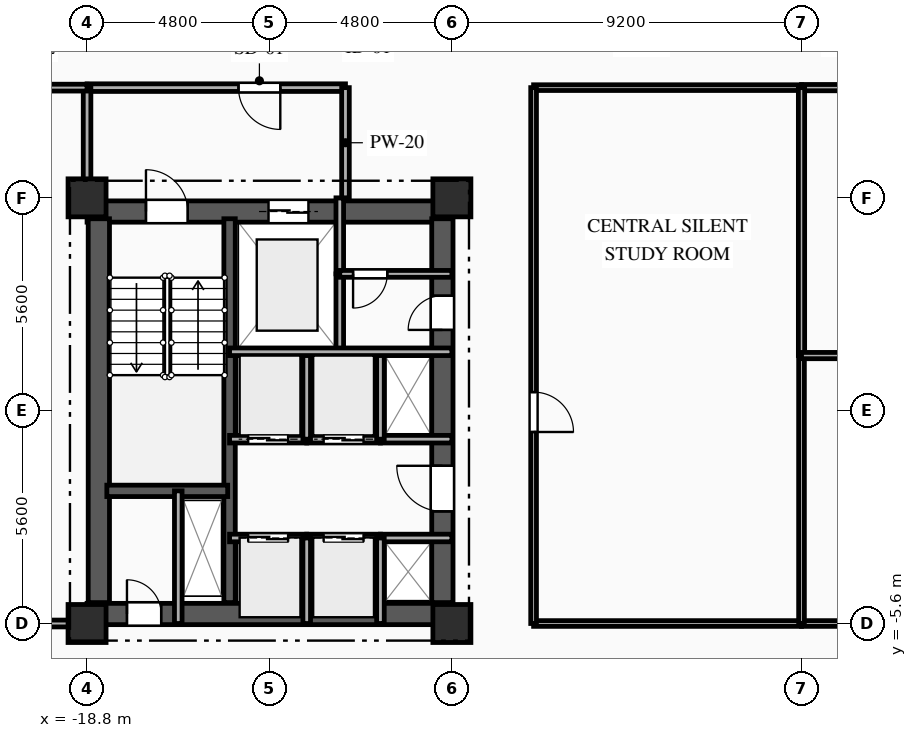
"""IFC4 building model, lengths in metres.
Left out: names, types, materials, properties, quantities, classifications, styles, units other than length and angle.
Written with IfcOpenShell. Run it as: python <this file> out.ifc"""

import sys

from ifc_helpers import new_model, si_unit, direction, frame, frame_2d, origin, origin_2d, place, context, subcontext, project, spatial, rectangle, extrude, element, fill, save


model = new_model("IFC4")
c1 = context("Model", 3, precision=1e-05, world=origin(), true_north=direction((0.0, 1.0)))
c2 = subcontext(c1, "Body", "Model", "MODEL_VIEW")
j1 = project(units=[si_unit("LENGTHUNIT", "METRE"), si_unit("PLANEANGLEUNIT", "RADIAN")], contexts=[c1])
p1 = place(None, origin())
s1 = spatial("IfcSite", under=j1, at=p1, CompositionType="ELEMENT")
p2 = place(p1, origin())
s2 = spatial("IfcBuilding", under=s1, at=p2, CompositionType="ELEMENT")
p3 = place(p2, frame((0.0, 0.0, 82.35)))
s3 = spatial("IfcBuildingStorey", under=s2, at=p3, CompositionType="ELEMENT", Elevation=82.35)
for number, where, z_axis, x_axis in (
    (1, (-18.8, -5.6, 0.0), (0.0, 0.0, 1.0), (1.0, 0.0, 0.0)),
    (2, (-18.8, 5.6, 0.0), (0.0, 0.0, 1.0), (1.0, 0.0, 0.0)),
    (3, (-9.2, -5.6, 0.0), (0.0, 0.0, 1.0), (1.0, 0.0, 0.0)),
    (4, (-9.2, 5.6, 0.0), (0.0, 0.0, 1.0), (1.0, 0.0, 0.0)),
):
    element("IfcColumn", number, at=place(p3, frame(where, z_axis=z_axis, x_axis=x_axis)), inside=s3, PredefinedType="COLUMN", context=c2, shape_type="SweptSolid", body=[
        extrude(rectangle(XDim=1.0, YDim=1.0, at=origin_2d()), origin(), (0.0, 0.0, 1.0), 3.35),
    ])
p4 = place(p3, frame((-18.8, 5.24, 0.0), z_axis=(0.0, 0.0, 1.0), x_axis=(1.0, 0.0, 0.0)))
e5 = element("IfcWall", 5, at=p4, inside=s3, PredefinedType="SHEAR", context=c2, shape_type="SweptSolid", body=[
    extrude(rectangle(XDim=9.6, YDim=0.56, at=frame_2d((4.8, 0.0))), origin(), (0.0, 0.0, 1.0), 3.045),
])
p5 = place(p4, frame((1.55, 0.0, 0.0)))
e6 = element("IfcOpeningElement", 6, at=p5, cuts=e5, PredefinedType="OPENING", context=c2, shape_type="SweptSolid", body=[
    extrude(rectangle(XDim=1.1, YDim=2.15, at=frame_2d((0.55, 1.075))), frame((0.0, 0.29, 0.0), z_axis=(0.0, -1.0, 0.0), x_axis=(1.0, 0.0, 0.0)), (0.0, 0.0, 1.0), 0.58),
])
p6 = place(p4, frame((4.775, 0.0, 0.0)))
e7 = element("IfcOpeningElement", 7, at=p6, cuts=e5, PredefinedType="OPENING", context=c2, shape_type="SweptSolid", body=[
    extrude(rectangle(XDim=1.05, YDim=2.1, at=frame_2d((0.525, 1.05))), frame((0.0, 0.29, 0.0), z_axis=(0.0, -1.0, 0.0), x_axis=(1.0, 0.0, 0.0)), (0.0, 0.0, 1.0), 0.58),
])
p7 = place(p3, frame((-18.8, -5.35, 0.0), z_axis=(0.0, 0.0, 1.0), x_axis=(1.0, 0.0, 0.0)))
e8 = element("IfcWall", 8, at=p7, inside=s3, PredefinedType="SHEAR", context=c2, shape_type="SweptSolid", body=[
    extrude(rectangle(XDim=9.6, YDim=0.56, at=frame_2d((4.8, 0.0))), origin(), (0.0, 0.0, 1.0), 3.045),
])
p8 = place(p7, frame((1.05, 0.0, 0.0)))
e9 = element("IfcOpeningElement", 9, at=p8, cuts=e8, PredefinedType="OPENING", context=c2, shape_type="SweptSolid", body=[
    extrude(rectangle(XDim=0.9, YDim=2.1, at=frame_2d((0.45, 1.05))), frame((0.0, 0.29, 0.0), z_axis=(0.0, -1.0, 0.0), x_axis=(1.0, 0.0, 0.0)), (0.0, 0.0, 1.0), 0.58),
])
p9 = place(p3, frame((-18.49, -5.05, 0.0), z_axis=(0.0, 0.0, 1.0), x_axis=(0.0, 1.0, 0.0)))
e10 = element("IfcWall", 10, at=p9, inside=s3, PredefinedType="SHEAR", context=c2, shape_type="SweptSolid", body=[
    extrude(rectangle(XDim=10.1, YDim=0.56, at=frame_2d((5.05, 0.0))), origin(), (0.0, 0.0, 1.0), 3.045),
])
p10 = place(p3, frame((-9.45, -5.05, 0.0), z_axis=(0.0, 0.0, 1.0), x_axis=(0.0, 1.0, 0.0)))
e11 = element("IfcWall", 11, at=p10, inside=s3, PredefinedType="SHEAR", context=c2, shape_type="SweptSolid", body=[
    extrude(rectangle(XDim=10.1, YDim=0.56, at=frame_2d((5.05, 0.0))), origin(), (0.0, 0.0, 1.0), 3.045),
])
p11 = place(p10, frame((7.175, 0.0, 0.0)))
e12 = element("IfcOpeningElement", 12, at=p11, cuts=e11, PredefinedType="OPENING", context=c2, shape_type="SweptSolid", body=[
    extrude(rectangle(XDim=0.9, YDim=2.1, at=frame_2d((0.45, 1.05))), frame((0.0, 0.29, 0.0), z_axis=(0.0, -1.0, 0.0), x_axis=(1.0, 0.0, 0.0)), (0.0, 0.0, 1.0), 0.58),
])
p12 = place(p10, frame((2.4, 0.0, 0.0)))
e13 = element("IfcOpeningElement", 13, at=p12, cuts=e11, PredefinedType="OPENING", context=c2, shape_type="SweptSolid", body=[
    extrude(rectangle(XDim=1.2, YDim=2.15, at=frame_2d((0.6, 1.075))), frame((0.0, 0.29, 0.0), z_axis=(0.0, -1.0, 0.0), x_axis=(1.0, 0.0, 0.0)), (0.0, 0.0, 1.0), 0.58),
])
p13 = place(p3, frame((-15.05, -5.05, 0.0), z_axis=(0.0, 0.0, 1.0), x_axis=(0.0, 1.0, 0.0)))
e14 = element("IfcWall", 14, at=p13, inside=s3, PredefinedType="SHEAR", context=c2, shape_type="SweptSolid", body=[
    extrude(rectangle(XDim=10.1, YDim=0.3, at=frame_2d((5.05, 0.0))), origin(), (0.0, 0.0, 1.0), 3.045),
])
p14 = place(p3, frame((-18.28, -2.11, 0.0), z_axis=(0.0, 0.0, 1.0), x_axis=(1.0, 0.0, 0.0)))
e15 = element("IfcWall", 15, at=p14, inside=s3, PredefinedType="SHEAR", context=c2, shape_type="SweptSolid", body=[
    extrude(rectangle(XDim=3.18, YDim=0.3, at=frame_2d((1.59, 0.0))), origin(), (0.0, 0.0, 1.0), 3.045),
])
p15 = place(p3, frame((-16.4, -5.6, 0.0), z_axis=(0.0, 0.0, 1.0), x_axis=(0.0, 1.0, 0.0)))
e16 = element("IfcWall", 16, at=p15, inside=s3, PredefinedType="PARTITIONING", context=c2, shape_type="SweptSolid", body=[
    extrude(rectangle(XDim=3.49, YDim=0.2, at=frame_2d((1.745, 0.0))), origin(), (0.0, 0.0, 1.0), 3.045),
])
p16 = place(p3, frame((-12.15, 1.55, 0.0), z_axis=(0.0, 0.0, 1.0), x_axis=(0.0, 1.0, 0.0)))
e17 = element("IfcWall", 17, at=p16, inside=s3, PredefinedType="PARTITIONING", context=c2, shape_type="SweptSolid", body=[
    extrude(rectangle(XDim=2.05, YDim=0.2, at=frame_2d((1.025, 0.0))), origin(), (0.0, 0.0, 1.0), 3.045),
])
p17 = place(p3, frame((-12.15, 3.6, 0.0), z_axis=(0.0, 0.0, 1.0), x_axis=(0.0, 1.0, 0.0)))
e18 = element("IfcWall", 18, at=p17, inside=s3, PredefinedType="PARTITIONING", context=c2, shape_type="SweptSolid", body=[
    extrude(rectangle(XDim=2.0, YDim=0.2, at=frame_2d((1.0, 0.0))), origin(), (0.0, 0.0, 1.0), 3.045),
])
p18 = place(p3, frame((-12.0, 8.5, 0.0), z_axis=(0.0, 0.0, 1.0), x_axis=(-1.0, 0.0, 0.0)))
e19 = element("IfcWall", 19, at=p18, inside=s3, PredefinedType="PARTITIONING", context=c2, shape_type="SweptSolid", body=[
    extrude(rectangle(XDim=6.8, YDim=0.2, at=frame_2d((3.4, 0.0))), origin(), (0.0, 0.0, 1.0), 3.045),
])
p19 = place(p18, frame((1.715, 0.0, 0.0)))
e20 = element("IfcOpeningElement", 20, at=p19, cuts=e19, PredefinedType="OPENING", context=c2, shape_type="SweptSolid", body=[
    extrude(rectangle(XDim=1.1, YDim=2.15, at=frame_2d((0.55, 1.075))), frame((0.0, 0.11, 0.0), z_axis=(0.0, -1.0, 0.0), x_axis=(1.0, 0.0, 0.0)), (0.0, 0.0, 1.0), 0.22),
])
p20 = place(p3, frame((-12.0, 5.6, 0.0), z_axis=(0.0, 0.0, 1.0), x_axis=(0.0, 1.0, 0.0)))
e21 = element("IfcWall", 21, at=p20, inside=s3, PredefinedType="PARTITIONING", context=c2, shape_type="SweptSolid", body=[
    extrude(rectangle(XDim=2.9, YDim=0.2, at=frame_2d((1.45, 0.0))), origin(), (0.0, 0.0, 1.0), 3.045),
])
p21 = place(p3, frame((-18.8, 8.5, 0.0), z_axis=(0.0, 0.0, 1.0), x_axis=(0.0, -1.0, 0.0)))
e22 = element("IfcWall", 22, at=p21, inside=s3, PredefinedType="PARTITIONING", context=c2, shape_type="SweptSolid", body=[
    extrude(rectangle(XDim=2.9, YDim=0.2, at=frame_2d((1.45, 0.0))), origin(), (0.0, 0.0, 1.0), 2.53),
])
p22 = place(p3, frame((-9.2, 3.6, 0.0), z_axis=(0.0, 0.0, 1.0), x_axis=(-1.0, 0.0, 0.0)))
e23 = element("IfcWall", 23, at=p22, inside=s3, PredefinedType="PARTITIONING", context=c2, shape_type="SweptSolid", body=[
    extrude(rectangle(XDim=2.95, YDim=0.18, at=frame_2d((1.475, 0.0))), origin(), (0.0, 0.0, 1.0), 3.045),
])
p23 = place(p22, frame((1.7, 0.0, 0.0)))
e24 = element("IfcOpeningElement", 24, at=p23, cuts=e23, PredefinedType="OPENING", context=c2, shape_type="SweptSolid", body=[
    extrude(rectangle(XDim=0.9, YDim=2.1, at=frame_2d((0.45, 1.05))), frame((0.0, 0.1, 0.0), z_axis=(0.0, -1.0, 0.0), x_axis=(1.0, 0.0, 0.0)), (0.0, 0.0, 1.0), 0.2),
])
p24 = place(p3, frame((-15.05, -3.35, 0.0), z_axis=(0.0, 0.0, 1.0), x_axis=(1.0, 0.0, 0.0)))
e25 = element("IfcWall", 25, at=p24, inside=s3, PredefinedType="PARTITIONING", context=c2, shape_type="SweptSolid", body=[
    extrude(rectangle(XDim=2.03, YDim=0.2, at=frame_2d((1.015, 0.0))), origin(), (0.0, 0.0, 1.0), 3.045),
])
p25 = place(p24, frame((0.49, 0.0, 0.0)))
e26 = element("IfcOpeningElement", 26, at=p25, cuts=e25, PredefinedType="OPENING", context=c2, shape_type="SweptSolid", body=[
    extrude(rectangle(XDim=1.05, YDim=2.1, at=frame_2d((0.525, 1.05))), frame((0.0, 0.11, 0.0), z_axis=(0.0, -1.0, 0.0), x_axis=(1.0, 0.0, 0.0)), (0.0, 0.0, 1.0), 0.22),
])
p26 = place(p3, frame((-13.02, -3.35, 0.0), z_axis=(0.0, 0.0, 1.0), x_axis=(1.0, 0.0, 0.0)))
e27 = element("IfcWall", 27, at=p26, inside=s3, PredefinedType="PARTITIONING", context=c2, shape_type="SweptSolid", body=[
    extrude(rectangle(XDim=1.94, YDim=0.2, at=frame_2d((0.97, 0.0))), origin(), (0.0, 0.0, 1.0), 3.045),
])
p27 = place(p26, frame((0.445, 0.0, 0.0)))
e28 = element("IfcOpeningElement", 28, at=p27, cuts=e27, PredefinedType="OPENING", context=c2, shape_type="SweptSolid", body=[
    extrude(rectangle(XDim=1.05, YDim=2.1, at=frame_2d((0.525, 1.05))), frame((0.0, 0.11, 0.0), z_axis=(0.0, -1.0, 0.0), x_axis=(1.0, 0.0, 0.0)), (0.0, 0.0, 1.0), 0.22),
])
p28 = place(p3, frame((-11.08, -3.35, 0.0), z_axis=(0.0, 0.0, 1.0), x_axis=(1.0, 0.0, 0.0)))
e29 = element("IfcWall", 29, at=p28, inside=s3, PredefinedType="PARTITIONING", context=c2, shape_type="SweptSolid", body=[
    extrude(rectangle(XDim=1.88, YDim=0.2, at=frame_2d((0.94, 0.0))), origin(), (0.0, 0.0, 1.0), 2.76),
])
p29 = place(p3, frame((-13.02, -0.75, 0.0), z_axis=(0.0, 0.0, 1.0), x_axis=(-1.0, 0.0, 0.0)))
e30 = element("IfcWall", 30, at=p29, inside=s3, PredefinedType="PARTITIONING", context=c2, shape_type="SweptSolid", body=[
    extrude(rectangle(XDim=2.03, YDim=0.2, at=frame_2d((1.015, 0.0))), origin(), (0.0, 0.0, 1.0), 3.045),
])
p30 = place(p29, frame((0.49, 0.0, 0.0)))
e31 = element("IfcOpeningElement", 31, at=p30, cuts=e30, PredefinedType="OPENING", context=c2, shape_type="SweptSolid", body=[
    extrude(rectangle(XDim=1.05, YDim=2.1, at=frame_2d((0.525, 1.05))), frame((0.0, 0.11, 0.0), z_axis=(0.0, -1.0, 0.0), x_axis=(1.0, 0.0, 0.0)), (0.0, 0.0, 1.0), 0.22),
])
p31 = place(p3, frame((-11.08, -0.75, 0.0), z_axis=(0.0, 0.0, 1.0), x_axis=(-1.0, 0.0, 0.0)))
e32 = element("IfcWall", 32, at=p31, inside=s3, PredefinedType="PARTITIONING", context=c2, shape_type="SweptSolid", body=[
    extrude(rectangle(XDim=1.94, YDim=0.2, at=frame_2d((0.97, 0.0))), origin(), (0.0, 0.0, 1.0), 3.045),
])
p32 = place(p31, frame((0.445, 0.0, 0.0)))
e33 = element("IfcOpeningElement", 33, at=p32, cuts=e32, PredefinedType="OPENING", context=c2, shape_type="SweptSolid", body=[
    extrude(rectangle(XDim=1.05, YDim=2.1, at=frame_2d((0.525, 1.05))), frame((0.0, 0.11, 0.0), z_axis=(0.0, -1.0, 0.0), x_axis=(1.0, 0.0, 0.0)), (0.0, 0.0, 1.0), 0.22),
])
p33 = place(p3, frame((-9.2, -0.75, 0.0), z_axis=(0.0, 0.0, 1.0), x_axis=(-1.0, 0.0, 0.0)))
e34 = element("IfcWall", 34, at=p33, inside=s3, PredefinedType="PARTITIONING", context=c2, shape_type="SweptSolid", body=[
    extrude(rectangle(XDim=1.88, YDim=0.2, at=frame_2d((0.94, 0.0))), origin(), (0.0, 0.0, 1.0), 3.045),
])
for number, where, z_axis, x_axis in (
    (35, (-13.02, -5.6, 0.0), (0.0, 0.0, 1.0), (0.0, 1.0, 0.0)),
    (36, (-11.08, -5.6, 0.0), (0.0, 0.0, 1.0), (0.0, 1.0, 0.0)),
):
    element("IfcWall", number, at=place(p3, frame(where, z_axis=z_axis, x_axis=x_axis)), inside=s3, PredefinedType="PARTITIONING", context=c2, shape_type="SweptSolid", body=[
        extrude(rectangle(XDim=2.25, YDim=0.2, at=frame_2d((1.125, 0.0))), origin(), (0.0, 0.0, 1.0), 3.045),
    ])
for number, where, z_axis, x_axis in (
    (37, (-13.02, -0.75, 0.0), (0.0, 0.0, 1.0), (0.0, 1.0, 0.0)),
    (38, (-11.08, -0.75, 0.0), (0.0, 0.0, 1.0), (0.0, 1.0, 0.0)),
):
    element("IfcWall", number, at=place(p3, frame(where, z_axis=z_axis, x_axis=x_axis)), inside=s3, PredefinedType="PARTITIONING", context=c2, shape_type="SweptSolid", body=[
        extrude(rectangle(XDim=2.3, YDim=0.2, at=frame_2d((1.15, 0.0))), origin(), (0.0, 0.0, 1.0), 3.045),
    ])
p34 = place(p3, frame((-18.8, 8.5, 0.0), z_axis=(0.0, 0.0, 1.0), x_axis=(-1.0, 0.0, 0.0)))
e39 = element("IfcWall", 39, at=p34, inside=s3, PredefinedType="PARTITIONING", context=c2, shape_type="SweptSolid", body=[
    extrude(rectangle(XDim=2.65, YDim=0.18, at=frame_2d((1.325, 0.0))), origin(), (0.0, 0.0, 1.0), 3.045),
])
p35 = place(p34, frame((1.009, 0.0, 0.0)))
e40 = element("IfcOpeningElement", 40, at=p35, cuts=e39, PredefinedType="OPENING", context=c2, shape_type="SweptSolid", body=[
    extrude(rectangle(XDim=1.0, YDim=2.15, at=frame_2d((0.5, 1.075))), frame((0.0, 0.1, 0.0), z_axis=(0.0, -1.0, 0.0), x_axis=(1.0, 0.0, 0.0)), (0.0, 0.0, 1.0), 0.2),
])
p36 = place(p3, frame((0.0, 8.5, 0.0), z_axis=(0.0, 0.0, 1.0), x_axis=(-1.0, 0.0, 0.0)))
e41 = element("IfcWall", 41, at=p36, inside=s3, PredefinedType="PARTITIONING", context=c2, shape_type="SweptSolid", body=[
    extrude(rectangle(XDim=7.05, YDim=0.15, at=frame_2d((3.525, 0.0))), origin(), (0.0, 0.0, 1.0), 3.045),
])
p37 = place(p3, frame((7.05, 8.5, 0.0), z_axis=(0.0, 0.0, 1.0), x_axis=(-1.0, 0.0, 0.0)))
e42 = element("IfcWall", 42, at=p37, inside=s3, PredefinedType="PARTITIONING", context=c2, shape_type="SweptSolid", body=[
    extrude(rectangle(XDim=7.05, YDim=0.165, at=frame_2d((3.525, 0.0))), origin(), (0.0, 0.0, 1.0), 3.045),
])
p38 = place(p37, frame((4.728, 0.0, 0.0)))
e43 = element("IfcOpeningElement", 43, at=p38, cuts=e42, PredefinedType="OPENING", context=c2, shape_type="SweptSolid", body=[
    extrude(rectangle(XDim=1.15, YDim=2.15, at=frame_2d((0.575, 1.075))), frame((0.0, 0.093, 0.0), z_axis=(0.0, -1.0, 0.0), x_axis=(1.0, 0.0, 0.0)), (0.0, 0.0, 1.0), 0.185),
])
p39 = place(p3, frame((-21.45, -5.6, 0.0), z_axis=(0.0, 0.0, 1.0), x_axis=(1.0, 0.0, 0.0)))
e44 = element("IfcWall", 44, at=p39, inside=s3, PredefinedType="PARTITIONING", context=c2, shape_type="SweptSolid", body=[
    extrude(rectangle(XDim=2.65, YDim=0.18, at=frame_2d((1.325, 0.0))), origin(), (0.0, 0.0, 1.0), 3.045),
])
p40 = place(p3, frame((-7.05, -5.6, 0.0), z_axis=(0.0, 0.0, 1.0), x_axis=(1.0, 0.0, 0.0)))
e45 = element("IfcWall", 45, at=p40, inside=s3, PredefinedType="PARTITIONING", context=c2, shape_type="SweptSolid", body=[
    extrude(rectangle(XDim=7.05, YDim=0.15, at=frame_2d((3.525, 0.0))), origin(), (0.0, 0.0, 1.0), 2.53),
])
p41 = place(p3, frame((0.0, -5.6, 0.0), z_axis=(0.0, 0.0, 1.0), x_axis=(1.0, 0.0, 0.0)))
e46 = element("IfcWall", 46, at=p41, inside=s3, PredefinedType="PARTITIONING", context=c2, shape_type="SweptSolid", body=[
    extrude(rectangle(XDim=7.05, YDim=0.15, at=frame_2d((3.525, 0.0))), origin(), (0.0, 0.0, 1.0), 2.53),
])
p42 = place(p41, frame((1.185, 0.0, 0.0)))
e47 = element("IfcOpeningElement", 47, at=p42, cuts=e46, PredefinedType="OPENING", context=c2, shape_type="SweptSolid", body=[
    extrude(rectangle(XDim=1.05, YDim=2.15, at=frame_2d((0.525, 1.075))), frame((0.0, 0.085, 0.0), z_axis=(0.0, -1.0, 0.0), x_axis=(1.0, 0.0, 0.0)), (0.0, 0.0, 1.0), 0.17),
])
p43 = place(p3, frame((-7.05, 8.5, 0.0), z_axis=(0.0, 0.0, 1.0), x_axis=(0.0, -1.0, 0.0)))
e48 = element("IfcWall", 48, at=p43, inside=s3, PredefinedType="PARTITIONING", context=c2, shape_type="SweptSolid", body=[
    extrude(rectangle(XDim=14.1, YDim=0.15, at=frame_2d((7.05, 0.0))), origin(), (0.0, 0.0, 1.0), 3.045),
])
p44 = place(p43, frame((8.011, 0.0, 0.0)))
e49 = element("IfcOpeningElement", 49, at=p44, cuts=e48, PredefinedType="OPENING", context=c2, shape_type="SweptSolid", body=[
    extrude(rectangle(XDim=1.05, YDim=2.15, at=frame_2d((0.525, 1.075))), frame((0.0, 0.085, 0.0), z_axis=(0.0, -1.0, 0.0), x_axis=(1.0, 0.0, 0.0)), (0.0, 0.0, 1.0), 0.17),
])
p45 = place(p3, frame((0.0, 1.45, 0.0), z_axis=(0.0, 0.0, 1.0), x_axis=(0.0, -1.0, 0.0)))
e50 = element("IfcWall", 50, at=p45, inside=s3, PredefinedType="PARTITIONING", context=c2, shape_type="SweptSolid", body=[
    extrude(rectangle(XDim=7.05, YDim=0.15, at=frame_2d((3.525, 0.0))), origin(), (0.0, 0.0, 1.0), 3.045),
])
for number, where, z_axis, x_axis in (
    (51, (0.0, 8.5, 0.0), (0.0, 0.0, 1.0), (0.0, -1.0, 0.0)),
    (52, (0.0, 1.45, 0.0), (0.0, 0.0, 1.0), (1.0, 0.0, 0.0)),
):
    element("IfcWall", number, at=place(p3, frame(where, z_axis=z_axis, x_axis=x_axis)), inside=s3, PredefinedType="PARTITIONING", context=c2, shape_type="SweptSolid", body=[
        extrude(rectangle(XDim=7.05, YDim=0.165, at=frame_2d((3.525, 0.0))), origin(), (0.0, 0.0, 1.0), 3.045),
    ])
p46 = place(p3, frame((-15.05, 1.55, 0.0), z_axis=(0.0, 0.0, 1.0), x_axis=(1.0, 0.0, 0.0)))
e53 = element("IfcWall", 53, at=p46, inside=s3, PredefinedType="PARTITIONING", context=c2, shape_type="SweptSolid", body=[
    extrude(rectangle(XDim=5.85, YDim=0.2, at=frame_2d((2.925, 0.0))), origin(), (0.0, 0.0, 1.0), 3.045),
])
p47 = place(p5, origin())
e54 = element("IfcDoor", 54, at=p47, inside=s3, OperationType="SINGLE_SWING_LEFT", PredefinedType="DOOR", context=c2, shape_type="SweptSolid", body=[
    extrude(rectangle(XDim=1.1, YDim=2.15, at=frame_2d((0.55, 1.075))), frame((0.0, 0.025, 0.0), z_axis=(0.0, -1.0, 0.0), x_axis=(1.0, 0.0, 0.0)), (0.0, 0.0, 1.0), 0.05),
])
fill(e6, e54)
p48 = place(p6, origin())
e55 = element("IfcDoor", 55, at=p48, inside=s3, OperationType="DOUBLE_DOOR_SLIDING", PredefinedType="DOOR", context=c2, shape_type="SweptSolid", body=[
    extrude(rectangle(XDim=1.05, YDim=2.1, at=frame_2d((0.525, 1.05))), frame((0.0, 0.025, 0.0), z_axis=(0.0, -1.0, 0.0), x_axis=(1.0, 0.0, 0.0)), (0.0, 0.0, 1.0), 0.05),
])
fill(e7, e55)
p49 = place(p8, origin())
e56 = element("IfcDoor", 56, at=p49, inside=s3, OperationType="SINGLE_SWING_LEFT", PredefinedType="DOOR", context=c2, shape_type="SweptSolid", body=[
    extrude(rectangle(XDim=0.9, YDim=2.1, at=frame_2d((0.45, 1.05))), frame((0.0, 0.025, 0.0), z_axis=(0.0, -1.0, 0.0), x_axis=(1.0, 0.0, 0.0)), (0.0, 0.0, 1.0), 0.05),
])
fill(e9, e56)
p50 = place(p19, origin())
e57 = element("IfcDoor", 57, at=p50, inside=s3, OperationType="SINGLE_SWING_LEFT", PredefinedType="DOOR", context=c2, shape_type="SweptSolid", body=[
    extrude(rectangle(XDim=1.1, YDim=2.15, at=frame_2d((0.55, 1.075))), frame((0.0, 0.025, 0.0), z_axis=(0.0, -1.0, 0.0), x_axis=(1.0, 0.0, 0.0)), (0.0, 0.0, 1.0), 0.05),
])
fill(e20, e57)
p51 = place(p23, origin())
e58 = element("IfcDoor", 58, at=p51, inside=s3, OperationType="SINGLE_SWING_RIGHT", PredefinedType="DOOR", context=c2, shape_type="SweptSolid", body=[
    extrude(rectangle(XDim=0.9, YDim=2.1, at=frame_2d((0.45, 1.05))), frame((0.0, 0.025, 0.0), z_axis=(0.0, -1.0, 0.0), x_axis=(1.0, 0.0, 0.0)), (0.0, 0.0, 1.0), 0.05),
])
fill(e24, e58)
p52 = place(p11, origin())
e59 = element("IfcDoor", 59, at=p52, inside=s3, OperationType="SINGLE_SWING_LEFT", PredefinedType="DOOR", context=c2, shape_type="SweptSolid", body=[
    extrude(rectangle(XDim=0.9, YDim=2.1, at=frame_2d((0.45, 1.05))), frame((0.0, 0.025, 0.0), z_axis=(0.0, -1.0, 0.0), x_axis=(1.0, 0.0, 0.0)), (0.0, 0.0, 1.0), 0.05),
])
fill(e12, e59)
p53 = place(p25, origin())
e60 = element("IfcDoor", 60, at=p53, inside=s3, OperationType="DOUBLE_DOOR_SLIDING", PredefinedType="DOOR", context=c2, shape_type="SweptSolid", body=[
    extrude(rectangle(XDim=1.05, YDim=2.1, at=frame_2d((0.525, 1.05))), frame((0.0, 0.025, 0.0), z_axis=(0.0, -1.0, 0.0), x_axis=(1.0, 0.0, 0.0)), (0.0, 0.0, 1.0), 0.05),
])
fill(e26, e60)
p54 = place(p27, origin())
e61 = element("IfcDoor", 61, at=p54, inside=s3, OperationType="DOUBLE_DOOR_SLIDING", PredefinedType="DOOR", context=c2, shape_type="SweptSolid", body=[
    extrude(rectangle(XDim=1.05, YDim=2.1, at=frame_2d((0.525, 1.05))), frame((0.0, 0.025, 0.0), z_axis=(0.0, -1.0, 0.0), x_axis=(1.0, 0.0, 0.0)), (0.0, 0.0, 1.0), 0.05),
])
fill(e28, e61)
p55 = place(p30, origin())
e62 = element("IfcDoor", 62, at=p55, inside=s3, OperationType="DOUBLE_DOOR_SLIDING", PredefinedType="DOOR", context=c2, shape_type="SweptSolid", body=[
    extrude(rectangle(XDim=1.05, YDim=2.1, at=frame_2d((0.525, 1.05))), frame((0.0, 0.025, 0.0), z_axis=(0.0, -1.0, 0.0), x_axis=(1.0, 0.0, 0.0)), (0.0, 0.0, 1.0), 0.05),
])
fill(e31, e62)
p56 = place(p32, origin())
e63 = element("IfcDoor", 63, at=p56, inside=s3, OperationType="DOUBLE_DOOR_SLIDING", PredefinedType="DOOR", context=c2, shape_type="SweptSolid", body=[
    extrude(rectangle(XDim=1.05, YDim=2.1, at=frame_2d((0.525, 1.05))), frame((0.0, 0.025, 0.0), z_axis=(0.0, -1.0, 0.0), x_axis=(1.0, 0.0, 0.0)), (0.0, 0.0, 1.0), 0.05),
])
fill(e33, e63)
p57 = place(p12, origin())
e64 = element("IfcDoor", 64, at=p57, inside=s3, OperationType="SINGLE_SWING_RIGHT", PredefinedType="DOOR", context=c2, shape_type="SweptSolid", body=[
    extrude(rectangle(XDim=1.2, YDim=2.15, at=frame_2d((0.6, 1.075))), frame((0.0, 0.025, 0.0), z_axis=(0.0, -1.0, 0.0), x_axis=(1.0, 0.0, 0.0)), (0.0, 0.0, 1.0), 0.05),
])
fill(e13, e64)
p58 = place(p44, origin())
e65 = element("IfcDoor", 65, at=p58, inside=s3, OperationType="SINGLE_SWING_RIGHT", PredefinedType="DOOR", context=c2, shape_type="SweptSolid", body=[
    extrude(rectangle(XDim=1.05, YDim=2.15, at=frame_2d((0.525, 1.075))), frame((0.0, 0.025, 0.0), z_axis=(0.0, -1.0, 0.0), x_axis=(1.0, 0.0, 0.0)), (0.0, 0.0, 1.0), 0.05),
])
fill(e49, e65)
save(model, sys.argv[1])
